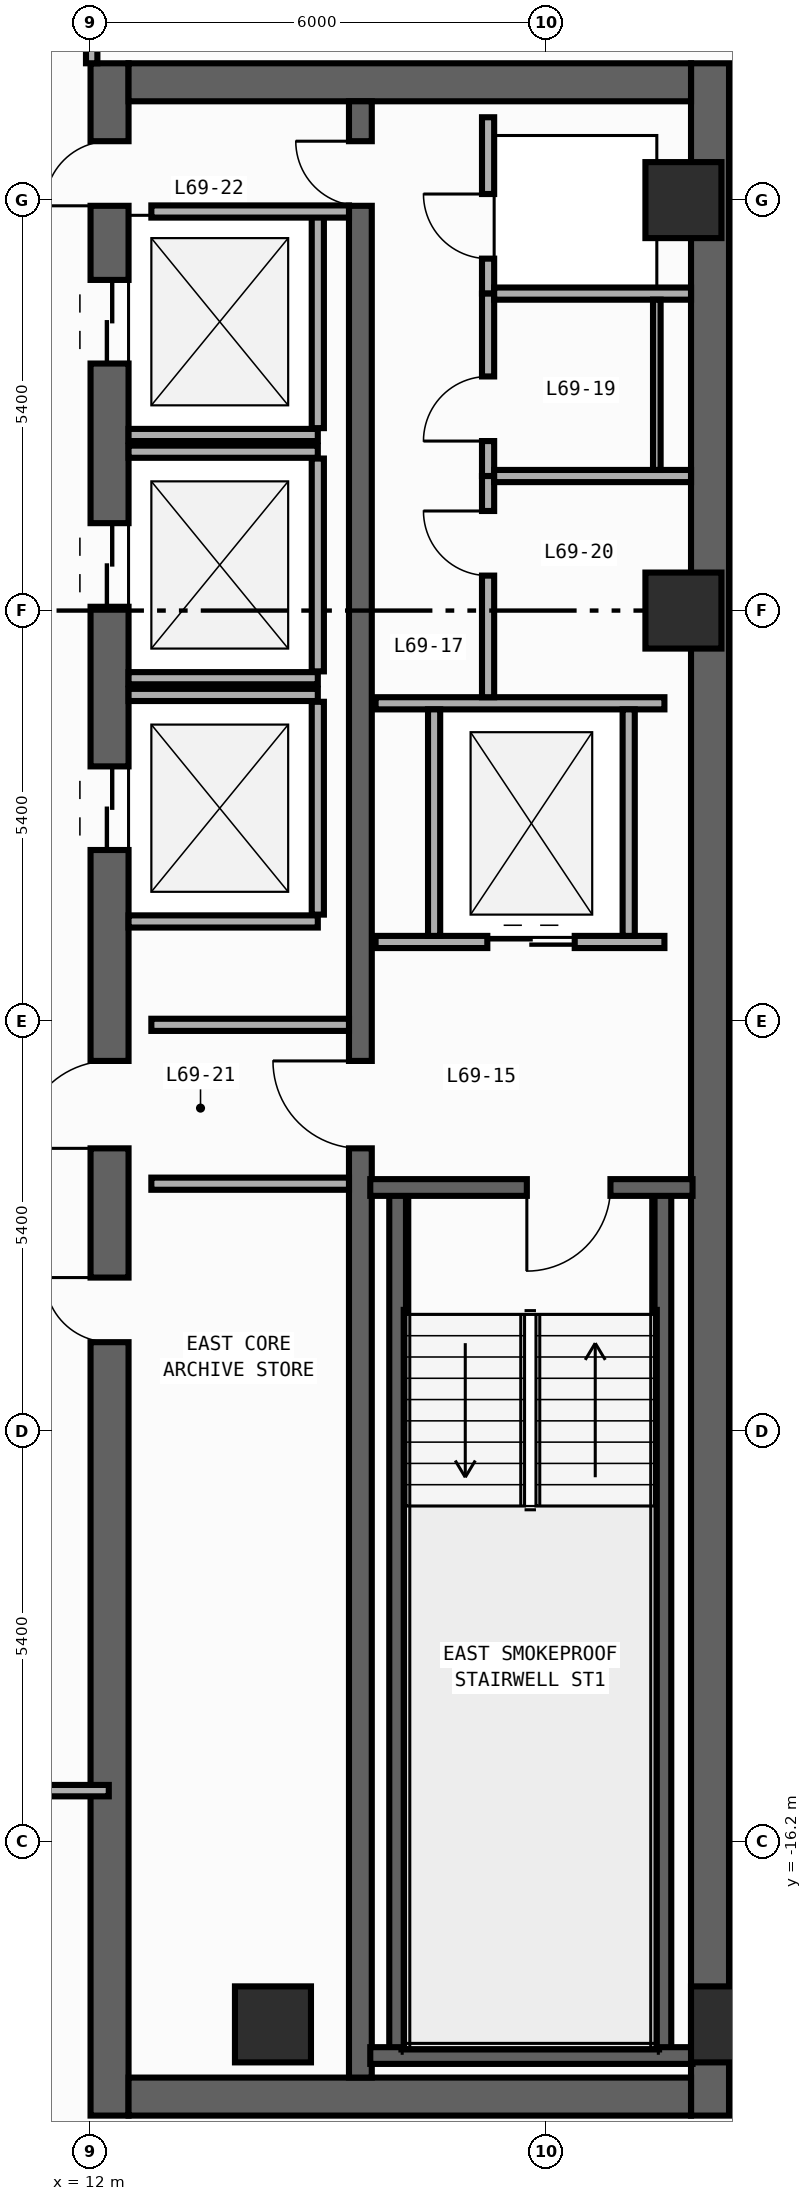
"""IFC4 building model, lengths in metres.
Left out: names, types, materials, properties, quantities, classifications, styles, units other than length and angle.
Written with IfcOpenShell. Run it as: python <this file> out.ifc"""

import sys

from ifc_helpers import new_model, si_unit, direction, frame, frame_2d, origin, origin_2d, place, context, subcontext, project, spatial, rectangle, circle, extrude, element, fill, save


model = new_model("IFC4")
c1 = context("Model", 3, precision=1e-05, world=origin(), true_north=direction((0.0, 1.0)))
c2 = subcontext(c1, "Body", "Model", "MODEL_VIEW")
j1 = project(units=[si_unit("LENGTHUNIT", "METRE"), si_unit("PLANEANGLEUNIT", "RADIAN")], contexts=[c1])
p1 = place(None, origin())
s1 = spatial("IfcSite", under=j1, at=p1, CompositionType="ELEMENT")
p2 = place(p1, origin())
s2 = spatial("IfcBuilding", under=s1, at=p2, CompositionType="ELEMENT")
p3 = place(p2, frame((0.0, 0.0, 289.0)))
s3 = spatial("IfcBuildingStorey", under=s2, at=p3, CompositionType="ELEMENT", Elevation=289.0)
p4 = place(p3, frame((12.25, -19.8, 0.0), z_axis=(0.0, 0.0, 1.0), x_axis=(0.0, 1.0, 0.0)))
e1 = element("IfcWall", 1, at=p4, inside=s3, PredefinedType="SHEAR", context=c2, shape_type="SweptSolid", body=[
    extrude(rectangle(XDim=27.0, YDim=0.5, at=frame_2d((13.5, 0.0))), origin(), (0.0, 0.0, 1.0), 3.54),
])
p5 = place(p4, frame((23.05, 0.0, 0.0)))
e2 = element("IfcOpeningElement", 2, at=p5, cuts=e1, PredefinedType="OPENING", context=c2, shape_type="SweptSolid", body=[
    extrude(rectangle(XDim=1.1, YDim=2.2, at=frame_2d((0.55, 1.1))), frame((0.0, 0.26, 0.0), z_axis=(0.0, -1.0, 0.0), x_axis=(1.0, 0.0, 0.0)), (0.0, 0.0, 1.0), 0.52),
])
p6 = place(p4, frame((19.85, 0.0, 0.0)))
e3 = element("IfcOpeningElement", 3, at=p6, cuts=e1, PredefinedType="OPENING", context=c2, shape_type="SweptSolid", body=[
    extrude(rectangle(XDim=1.1, YDim=2.2, at=frame_2d((0.55, 1.1))), frame((0.0, 0.26, 0.0), z_axis=(0.0, -1.0, 0.0), x_axis=(1.0, 0.0, 0.0)), (0.0, 0.0, 1.0), 0.52),
])
p7 = place(p4, frame((16.65, 0.0, 0.0)))
e4 = element("IfcOpeningElement", 4, at=p7, cuts=e1, PredefinedType="OPENING", context=c2, shape_type="SweptSolid", body=[
    extrude(rectangle(XDim=1.1, YDim=2.2, at=frame_2d((0.55, 1.1))), frame((0.0, 0.26, 0.0), z_axis=(0.0, -1.0, 0.0), x_axis=(1.0, 0.0, 0.0)), (0.0, 0.0, 1.0), 0.52),
])
p8 = place(p4, frame((10.175, 0.0, 0.0)))
e5 = element("IfcOpeningElement", 5, at=p8, cuts=e1, PredefinedType="OPENING", context=c2, shape_type="SweptSolid", body=[
    extrude(rectangle(XDim=0.85, YDim=2.1, at=frame_2d((0.425, 1.05))), frame((0.0, 0.26, 0.0), z_axis=(0.0, -1.0, 0.0), x_axis=(1.0, 0.0, 0.0)), (0.0, 0.0, 1.0), 0.52),
])
p9 = place(p4, frame((12.725, 0.0, 0.0)))
e6 = element("IfcOpeningElement", 6, at=p9, cuts=e1, PredefinedType="OPENING", context=c2, shape_type="SweptSolid", body=[
    extrude(rectangle(XDim=1.15, YDim=2.2, at=frame_2d((0.575, 1.1))), frame((0.0, 0.26, 0.0), z_axis=(0.0, -1.0, 0.0), x_axis=(1.0, 0.0, 0.0)), (0.0, 0.0, 1.0), 0.52),
])
p10 = place(p4, frame((25.125, 0.0, 0.0)))
e7 = element("IfcOpeningElement", 7, at=p10, cuts=e1, PredefinedType="OPENING", context=c2, shape_type="SweptSolid", body=[
    extrude(rectangle(XDim=0.85, YDim=2.1, at=frame_2d((0.425, 1.05))), frame((0.0, 0.26, 0.0), z_axis=(0.0, -1.0, 0.0), x_axis=(1.0, 0.0, 0.0)), (0.0, 0.0, 1.0), 0.52),
])
p11 = place(p3, frame((20.15, -19.8, 0.0), z_axis=(0.0, 0.0, 1.0), x_axis=(0.0, 1.0, 0.0)))
e8 = element("IfcWall", 8, at=p11, inside=s3, PredefinedType="SHEAR", context=c2, shape_type="SweptSolid", body=[
    extrude(rectangle(XDim=27.0, YDim=0.5, at=frame_2d((13.5, 0.0))), origin(), (0.0, 0.0, 1.0), 3.54),
])
for number, where, z_axis, x_axis in (
    (9, (12.5, -19.55, 0.0), (0.0, 0.0, 1.0), (1.0, 0.0, 0.0)),
    (10, (12.5, 6.95, 0.0), (0.0, 0.0, 1.0), (1.0, 0.0, 0.0)),
):
    element("IfcWall", number, at=place(p3, frame(where, z_axis=z_axis, x_axis=x_axis)), inside=s3, PredefinedType="SHEAR", context=c2, shape_type="SweptSolid", body=[
        extrude(rectangle(XDim=7.4, YDim=0.5, at=frame_2d((3.7, 0.0))), origin(), (0.0, 0.0, 1.0), 3.54),
    ])
p12 = place(p3, frame((15.55, -19.3, 0.0), z_axis=(0.0, 0.0, 1.0), x_axis=(0.0, 1.0, 0.0)))
e11 = element("IfcWall", 11, at=p12, inside=s3, PredefinedType="SHEAR", context=c2, shape_type="SweptSolid", body=[
    extrude(rectangle(XDim=26.0, YDim=0.3, at=frame_2d((13.0, 0.0))), origin(), (0.0, 0.0, 1.0), 3.54),
])
p13 = place(p12, frame((12.225, 0.0, 0.0)))
e12 = element("IfcOpeningElement", 12, at=p13, cuts=e11, PredefinedType="OPENING", context=c2, shape_type="SweptSolid", body=[
    extrude(rectangle(XDim=1.15, YDim=2.2, at=frame_2d((0.575, 1.1))), frame((0.0, 0.16, 0.0), z_axis=(0.0, -1.0, 0.0), x_axis=(1.0, 0.0, 0.0)), (0.0, 0.0, 1.0), 0.32),
])
p14 = place(p12, frame((24.625, 0.0, 0.0)))
e13 = element("IfcOpeningElement", 13, at=p14, cuts=e11, PredefinedType="OPENING", context=c2, shape_type="SweptSolid", body=[
    extrude(rectangle(XDim=0.85, YDim=2.1, at=frame_2d((0.425, 1.05))), frame((0.0, 0.16, 0.0), z_axis=(0.0, -1.0, 0.0), x_axis=(1.0, 0.0, 0.0)), (0.0, 0.0, 1.0), 0.32),
])
for number, where, z_axis, x_axis in (
    (14, (16.04, -19.01, 0.0), (0.0, 0.0, 1.0), (0.0, 1.0, 0.0)),
    (15, (19.53, -19.01, 0.0), (0.0, 0.0, 1.0), (0.0, 1.0, 0.0)),
):
    element("IfcWall", number, at=place(p3, frame(where, z_axis=z_axis, x_axis=x_axis)), inside=s3, PredefinedType="SHEAR", context=c2, shape_type="SweptSolid", body=[
        extrude(rectangle(XDim=11.42, YDim=0.22, at=frame_2d((5.71, 0.0))), origin(), (0.0, 0.0, 1.0), 3.54),
    ])
p15 = place(p3, frame((15.68, -19.01, 0.0), z_axis=(0.0, 0.0, 1.0), x_axis=(1.0, 0.0, 0.0)))
e16 = element("IfcWall", 16, at=p15, inside=s3, PredefinedType="SHEAR", context=c2, shape_type="SweptSolid", body=[
    extrude(rectangle(XDim=4.24, YDim=0.22, at=frame_2d((2.12, 0.0))), origin(), (0.0, 0.0, 1.0), 3.54),
])
p16 = place(p3, frame((19.92, -7.59, 0.0), z_axis=(0.0, 0.0, 1.0), x_axis=(-1.0, 0.0, 0.0)))
e17 = element("IfcWall", 17, at=p16, inside=s3, PredefinedType="SHEAR", context=c2, shape_type="SweptSolid", body=[
    extrude(rectangle(XDim=4.24, YDim=0.22, at=frame_2d((2.12, 0.0))), origin(), (0.0, 0.0, 1.0), 3.54),
])
p17 = place(p16, frame((1.08, 0.0, 0.0)))
e18 = element("IfcOpeningElement", 18, at=p17, cuts=e17, PredefinedType="OPENING", context=c2, shape_type="SweptSolid", body=[
    extrude(rectangle(XDim=1.1, YDim=2.2, at=frame_2d((0.55, 1.1))), frame((0.0, 0.12, 0.0), z_axis=(0.0, -1.0, 0.0), x_axis=(1.0, 0.0, 0.0)), (0.0, 0.0, 1.0), 0.24),
])
for number, where, z_axis, x_axis in (
    (19, (20.4, -18.6, 0.0), (0.0, 0.0, 1.0), (1.0, 0.0, 0.0)),
    (20, (14.4, -18.6, 0.0), (0.0, 0.0, 1.0), (1.0, 0.0, 0.0)),
    (21, (19.8, 0.0, 0.0), (0.0, 0.0, 1.0), (1.0, 0.0, 0.0)),
    (22, (19.8, 5.4, 0.0), (0.0, 0.0, 1.0), (1.0, 0.0, 0.0)),
):
    element("IfcColumn", number, at=place(p3, frame(where, z_axis=z_axis, x_axis=x_axis)), inside=s3, PredefinedType="COLUMN", context=c2, shape_type="SweptSolid", body=[
        extrude(circle(Radius=0.5, at=origin_2d()), origin(), (0.0, 0.0, 1.0), 3.8),
    ])
p18 = place(p3, frame((12.5, 2.31, 0.0), z_axis=(0.0, 0.0, 1.0), x_axis=(1.0, 0.0, 0.0)))
e23 = element("IfcWall", 23, at=p18, inside=s3, PredefinedType="STANDARD", context=c2, shape_type="SweptSolid", body=[
    extrude(rectangle(XDim=2.49, YDim=0.16, at=frame_2d((1.245, 0.0))), origin(), (0.0, 0.0, 1.0), 3.54),
])
p19 = place(p3, frame((14.99, 2.4, 0.0), z_axis=(0.0, 0.0, 1.0), x_axis=(0.0, 1.0, 0.0)))
e24 = element("IfcWall", 24, at=p19, inside=s3, PredefinedType="STANDARD", context=c2, shape_type="SweptSolid", body=[
    extrude(rectangle(XDim=2.8, YDim=0.16, at=frame_2d((1.4, 0.0))), origin(), (0.0, 0.0, 1.0), 3.54),
])
for number, where, z_axis, x_axis in (
    (25, (12.5, -0.89, 0.0), (0.0, 0.0, 1.0), (1.0, 0.0, 0.0)),
    (26, (12.5, 2.09, 0.0), (0.0, 0.0, 1.0), (1.0, 0.0, 0.0)),
):
    element("IfcWall", number, at=place(p3, frame(where, z_axis=z_axis, x_axis=x_axis)), inside=s3, PredefinedType="STANDARD", context=c2, shape_type="SweptSolid", body=[
        extrude(rectangle(XDim=2.49, YDim=0.16, at=frame_2d((1.245, 0.0))), origin(), (0.0, 0.0, 1.0), 3.54),
    ])
p20 = place(p3, frame((14.99, -0.8, 0.0), z_axis=(0.0, 0.0, 1.0), x_axis=(0.0, 1.0, 0.0)))
e27 = element("IfcWall", 27, at=p20, inside=s3, PredefinedType="STANDARD", context=c2, shape_type="SweptSolid", body=[
    extrude(rectangle(XDim=2.8, YDim=0.16, at=frame_2d((1.4, 0.0))), origin(), (0.0, 0.0, 1.0), 3.54),
])
for number, where, z_axis, x_axis in (
    (28, (12.5, -4.09, 0.0), (0.0, 0.0, 1.0), (1.0, 0.0, 0.0)),
    (29, (12.5, -1.11, 0.0), (0.0, 0.0, 1.0), (1.0, 0.0, 0.0)),
):
    element("IfcWall", number, at=place(p3, frame(where, z_axis=z_axis, x_axis=x_axis)), inside=s3, PredefinedType="STANDARD", context=c2, shape_type="SweptSolid", body=[
        extrude(rectangle(XDim=2.49, YDim=0.16, at=frame_2d((1.245, 0.0))), origin(), (0.0, 0.0, 1.0), 3.54),
    ])
p21 = place(p3, frame((14.99, -4.0, 0.0), z_axis=(0.0, 0.0, 1.0), x_axis=(0.0, 1.0, 0.0)))
e30 = element("IfcWall", 30, at=p21, inside=s3, PredefinedType="STANDARD", context=c2, shape_type="SweptSolid", body=[
    extrude(rectangle(XDim=2.8, YDim=0.16, at=frame_2d((1.4, 0.0))), origin(), (0.0, 0.0, 1.0), 3.54),
])
p22 = place(p3, frame((15.75, -4.36, 0.0), z_axis=(0.0, 0.0, 1.0), x_axis=(1.0, 0.0, 0.0)))
e31 = element("IfcWall", 31, at=p22, inside=s3, PredefinedType="STANDARD", context=c2, shape_type="SweptSolid", body=[
    extrude(rectangle(XDim=3.8, YDim=0.16, at=frame_2d((1.9, 0.0))), origin(), (0.0, 0.0, 1.0), 3.54),
])
p23 = place(p22, frame((1.47, 0.0, 0.0)))
e32 = element("IfcOpeningElement", 32, at=p23, cuts=e31, PredefinedType="OPENING", context=c2, shape_type="SweptSolid", body=[
    extrude(rectangle(XDim=1.15, YDim=2.2, at=frame_2d((0.575, 1.1))), frame((0.0, 0.09, 0.0), z_axis=(0.0, -1.0, 0.0), x_axis=(1.0, 0.0, 0.0)), (0.0, 0.0, 1.0), 0.18),
])
p24 = place(p3, frame((15.75, -1.22, 0.0), z_axis=(0.0, 0.0, 1.0), x_axis=(1.0, 0.0, 0.0)))
e33 = element("IfcWall", 33, at=p24, inside=s3, PredefinedType="STANDARD", context=c2, shape_type="SweptSolid", body=[
    extrude(rectangle(XDim=3.8, YDim=0.16, at=frame_2d((1.9, 0.0))), origin(), (0.0, 0.0, 1.0), 3.54),
])
for number, where, z_axis, x_axis in (
    (34, (16.52, -4.28, 0.0), (0.0, 0.0, 1.0), (0.0, 1.0, 0.0)),
    (35, (19.08, -4.28, 0.0), (0.0, 0.0, 1.0), (0.0, 1.0, 0.0)),
):
    element("IfcWall", number, at=place(p3, frame(where, z_axis=z_axis, x_axis=x_axis)), inside=s3, PredefinedType="STANDARD", context=c2, shape_type="SweptSolid", body=[
        extrude(rectangle(XDim=2.98, YDim=0.16, at=frame_2d((1.49, 0.0))), origin(), (0.0, 0.0, 1.0), 3.54),
    ])
for number, where, z_axis, x_axis in (
    (36, (12.8, -5.45, 0.0), (0.0, 0.0, 1.0), (1.0, 0.0, 0.0)),
    (37, (12.8, -7.54, 0.0), (0.0, 0.0, 1.0), (1.0, 0.0, 0.0)),
    (38, (12.8, 5.25, 0.0), (0.0, 0.0, 1.0), (1.0, 0.0, 0.0)),
):
    element("IfcWall", number, at=place(p3, frame(where, z_axis=z_axis, x_axis=x_axis)), inside=s3, PredefinedType="STANDARD", context=c2, shape_type="SweptSolid", body=[
        extrude(rectangle(XDim=2.6, YDim=0.16, at=frame_2d((1.3, 0.0))), origin(), (0.0, 0.0, 1.0), 3.54),
    ])
p25 = place(p3, frame((17.23, 4.17, 0.0), z_axis=(0.0, 0.0, 1.0), x_axis=(0.0, 1.0, 0.0)))
e39 = element("IfcWall", 39, at=p25, inside=s3, PredefinedType="PARTITIONING", context=c2, shape_type="SweptSolid", body=[
    extrude(rectangle(XDim=2.32, YDim=0.16, at=frame_2d((1.16, 0.0))), origin(), (0.0, 0.0, 1.0), 3.54),
])
p26 = place(p25, frame((0.46, 0.0, 0.0)))
e40 = element("IfcOpeningElement", 40, at=p26, cuts=e39, PredefinedType="OPENING", context=c2, shape_type="SweptSolid", body=[
    extrude(rectangle(XDim=0.85, YDim=2.1, at=frame_2d((0.425, 1.05))), frame((0.0, 0.09, 0.0), z_axis=(0.0, -1.0, 0.0), x_axis=(1.0, 0.0, 0.0)), (0.0, 0.0, 1.0), 0.18),
])
p27 = place(p3, frame((17.23, 1.77, 0.0), z_axis=(0.0, 0.0, 1.0), x_axis=(0.0, 1.0, 0.0)))
e41 = element("IfcWall", 41, at=p27, inside=s3, PredefinedType="PARTITIONING", context=c2, shape_type="SweptSolid", body=[
    extrude(rectangle(XDim=2.4, YDim=0.16, at=frame_2d((1.2, 0.0))), origin(), (0.0, 0.0, 1.0), 3.54),
])
p28 = place(p27, frame((0.46, 0.0, 0.0)))
e42 = element("IfcOpeningElement", 42, at=p28, cuts=e41, PredefinedType="OPENING", context=c2, shape_type="SweptSolid", body=[
    extrude(rectangle(XDim=0.85, YDim=2.1, at=frame_2d((0.425, 1.05))), frame((0.0, 0.09, 0.0), z_axis=(0.0, -1.0, 0.0), x_axis=(1.0, 0.0, 0.0)), (0.0, 0.0, 1.0), 0.18),
])
p29 = place(p3, frame((17.23, -1.14, 0.0), z_axis=(0.0, 0.0, 1.0), x_axis=(0.0, 1.0, 0.0)))
e43 = element("IfcWall", 43, at=p29, inside=s3, PredefinedType="PARTITIONING", context=c2, shape_type="SweptSolid", body=[
    extrude(rectangle(XDim=2.91, YDim=0.16, at=frame_2d((1.455, 0.0))), origin(), (0.0, 0.0, 1.0), 3.54),
])
p30 = place(p29, frame((1.6, 0.0, 0.0)))
e44 = element("IfcOpeningElement", 44, at=p30, cuts=e43, PredefinedType="OPENING", context=c2, shape_type="SweptSolid", body=[
    extrude(rectangle(XDim=0.85, YDim=2.1, at=frame_2d((0.425, 1.05))), frame((0.0, 0.09, 0.0), z_axis=(0.0, -1.0, 0.0), x_axis=(1.0, 0.0, 0.0)), (0.0, 0.0, 1.0), 0.18),
])
for number, where, z_axis, x_axis in (
    (45, (17.31, 4.17, 0.0), (0.0, 0.0, 1.0), (1.0, 0.0, 0.0)),
    (46, (17.31, 1.77, 0.0), (0.0, 0.0, 1.0), (1.0, 0.0, 0.0)),
):
    element("IfcWall", number, at=place(p3, frame(where, z_axis=z_axis, x_axis=x_axis)), inside=s3, PredefinedType="PARTITIONING", context=c2, shape_type="SweptSolid", body=[
        extrude(rectangle(XDim=2.59, YDim=0.16, at=frame_2d((1.295, 0.0))), origin(), (0.0, 0.0, 1.0), 3.54),
    ])
p31 = place(p3, frame((12.015, 7.2, 0.0), z_axis=(0.0, 0.0, 1.0), x_axis=(0.0, 1.0, 0.0)))
e47 = element("IfcWall", 47, at=p31, inside=s3, PredefinedType="PARTITIONING", context=c2, shape_type="SweptSolid", body=[
    extrude(rectangle(XDim=6.68, YDim=0.15, at=frame_2d((3.34, 0.0))), origin(), (0.0, 0.0, 1.0), 3.54),
])
p32 = place(p31, frame((0.67, 0.0, 0.0)))
e48 = element("IfcOpeningElement", 48, at=p32, cuts=e47, PredefinedType="OPENING", context=c2, shape_type="SweptSolid", body=[
    extrude(rectangle(XDim=0.9, YDim=2.15, at=frame_2d((0.45, 1.075))), frame((0.0, 0.085, 0.0), z_axis=(0.0, -1.0, 0.0), x_axis=(1.0, 0.0, 0.0)), (0.0, 0.0, 1.0), 0.17),
])
p33 = place(p3, frame((9.705, -15.525, 0.0), z_axis=(0.0, 0.0, 1.0), x_axis=(1.0, 0.0, 0.0)))
e49 = element("IfcWall", 49, at=p33, inside=s3, PredefinedType="PARTITIONING", context=c2, shape_type="SweptSolid", body=[
    extrude(rectangle(XDim=2.535, YDim=0.15, at=frame_2d((1.268, 0.0))), origin(), (0.0, 0.0, 1.0), 3.54),
])
p34 = place(p3, frame((19.45, 4.09, 0.0), z_axis=(0.0, 0.0, 1.0), x_axis=(0.0, -1.0, 0.0)))
e50 = element("IfcWall", 50, at=p34, inside=s3, PredefinedType="PARTITIONING", context=c2, shape_type="SweptSolid", body=[
    extrude(rectangle(XDim=2.24, YDim=0.1, at=frame_2d((1.12, 0.0))), origin(), (0.0, 0.0, 1.0), 3.54),
])
p35 = place(p17, origin())
e51 = element("IfcDoor", 51, at=p35, inside=s3, OperationType="SINGLE_SWING_RIGHT", PredefinedType="DOOR", context=c2, shape_type="SweptSolid", body=[
    extrude(rectangle(XDim=1.1, YDim=2.2, at=frame_2d((0.55, 1.1))), frame((0.0, 0.025, 0.0), z_axis=(0.0, -1.0, 0.0), x_axis=(1.0, 0.0, 0.0)), (0.0, 0.0, 1.0), 0.05),
])
fill(e18, e51)
p36 = place(p5, origin())
e52 = element("IfcDoor", 52, at=p36, inside=s3, OperationType="DOUBLE_DOOR_SLIDING", PredefinedType="DOOR", context=c2, shape_type="SweptSolid", body=[
    extrude(rectangle(XDim=1.1, YDim=2.2, at=frame_2d((0.55, 1.1))), frame((0.0, 0.025, 0.0), z_axis=(0.0, -1.0, 0.0), x_axis=(1.0, 0.0, 0.0)), (0.0, 0.0, 1.0), 0.05),
])
fill(e2, e52)
p37 = place(p6, origin())
e53 = element("IfcDoor", 53, at=p37, inside=s3, OperationType="DOUBLE_DOOR_SLIDING", PredefinedType="DOOR", context=c2, shape_type="SweptSolid", body=[
    extrude(rectangle(XDim=1.1, YDim=2.2, at=frame_2d((0.55, 1.1))), frame((0.0, 0.025, 0.0), z_axis=(0.0, -1.0, 0.0), x_axis=(1.0, 0.0, 0.0)), (0.0, 0.0, 1.0), 0.05),
])
fill(e3, e53)
p38 = place(p7, origin())
e54 = element("IfcDoor", 54, at=p38, inside=s3, OperationType="DOUBLE_DOOR_SLIDING", PredefinedType="DOOR", context=c2, shape_type="SweptSolid", body=[
    extrude(rectangle(XDim=1.1, YDim=2.2, at=frame_2d((0.55, 1.1))), frame((0.0, 0.025, 0.0), z_axis=(0.0, -1.0, 0.0), x_axis=(1.0, 0.0, 0.0)), (0.0, 0.0, 1.0), 0.05),
])
fill(e4, e54)
p39 = place(p8, origin())
e55 = element("IfcDoor", 55, at=p39, inside=s3, OperationType="SINGLE_SWING_RIGHT", PredefinedType="DOOR", context=c2, shape_type="SweptSolid", body=[
    extrude(rectangle(XDim=0.85, YDim=2.1, at=frame_2d((0.425, 1.05))), frame((0.0, 0.025, 0.0), z_axis=(0.0, -1.0, 0.0), x_axis=(1.0, 0.0, 0.0)), (0.0, 0.0, 1.0), 0.05),
])
fill(e5, e55)
p40 = place(p9, origin())
e56 = element("IfcDoor", 56, at=p40, inside=s3, OperationType="SINGLE_SWING_LEFT", PredefinedType="DOOR", context=c2, shape_type="SweptSolid", body=[
    extrude(rectangle(XDim=1.15, YDim=2.2, at=frame_2d((0.575, 1.1))), frame((0.0, 0.025, 0.0), z_axis=(0.0, -1.0, 0.0), x_axis=(1.0, 0.0, 0.0)), (0.0, 0.0, 1.0), 0.05),
])
fill(e6, e56)
p41 = place(p13, origin())
e57 = element("IfcDoor", 57, at=p41, inside=s3, OperationType="SINGLE_SWING_RIGHT", PredefinedType="DOOR", context=c2, shape_type="SweptSolid", body=[
    extrude(rectangle(XDim=1.15, YDim=2.2, at=frame_2d((0.575, 1.1))), frame((0.0, 0.025, 0.0), z_axis=(0.0, -1.0, 0.0), x_axis=(1.0, 0.0, 0.0)), (0.0, 0.0, 1.0), 0.05),
])
fill(e12, e57)
p42 = place(p10, origin())
e58 = element("IfcDoor", 58, at=p42, inside=s3, OperationType="SINGLE_SWING_LEFT", PredefinedType="DOOR", context=c2, shape_type="SweptSolid", body=[
    extrude(rectangle(XDim=0.85, YDim=2.1, at=frame_2d((0.425, 1.05))), frame((0.0, 0.025, 0.0), z_axis=(0.0, -1.0, 0.0), x_axis=(1.0, 0.0, 0.0)), (0.0, 0.0, 1.0), 0.05),
])
fill(e7, e58)
p43 = place(p14, origin())
e59 = element("IfcDoor", 59, at=p43, inside=s3, OperationType="SINGLE_SWING_RIGHT", PredefinedType="DOOR", context=c2, shape_type="SweptSolid", body=[
    extrude(rectangle(XDim=0.85, YDim=2.1, at=frame_2d((0.425, 1.05))), frame((0.0, 0.025, 0.0), z_axis=(0.0, -1.0, 0.0), x_axis=(1.0, 0.0, 0.0)), (0.0, 0.0, 1.0), 0.05),
])
fill(e13, e59)
p44 = place(p23, origin())
e60 = element("IfcDoor", 60, at=p44, inside=s3, OperationType="DOUBLE_DOOR_SLIDING", PredefinedType="DOOR", context=c2, shape_type="SweptSolid", body=[
    extrude(rectangle(XDim=1.15, YDim=2.2, at=frame_2d((0.575, 1.1))), frame((0.0, 0.025, 0.0), z_axis=(0.0, -1.0, 0.0), x_axis=(1.0, 0.0, 0.0)), (0.0, 0.0, 1.0), 0.05),
])
fill(e32, e60)
p45 = place(p26, origin())
e61 = element("IfcDoor", 61, at=p45, inside=s3, OperationType="SINGLE_SWING_RIGHT", PredefinedType="DOOR", context=c2, shape_type="SweptSolid", body=[
    extrude(rectangle(XDim=0.85, YDim=2.1, at=frame_2d((0.425, 1.05))), frame((0.0, 0.025, 0.0), z_axis=(0.0, -1.0, 0.0), x_axis=(1.0, 0.0, 0.0)), (0.0, 0.0, 1.0), 0.05),
])
fill(e40, e61)
p46 = place(p28, origin())
e62 = element("IfcDoor", 62, at=p46, inside=s3, OperationType="SINGLE_SWING_LEFT", PredefinedType="DOOR", context=c2, shape_type="SweptSolid", body=[
    extrude(rectangle(XDim=0.85, YDim=2.1, at=frame_2d((0.425, 1.05))), frame((0.0, 0.025, 0.0), z_axis=(0.0, -1.0, 0.0), x_axis=(1.0, 0.0, 0.0)), (0.0, 0.0, 1.0), 0.05),
])
fill(e42, e62)
p47 = place(p30, origin())
e63 = element("IfcDoor", 63, at=p47, inside=s3, OperationType="SINGLE_SWING_RIGHT", PredefinedType="DOOR", context=c2, shape_type="SweptSolid", body=[
    extrude(rectangle(XDim=0.85, YDim=2.1, at=frame_2d((0.425, 1.05))), frame((0.0, 0.025, 0.0), z_axis=(0.0, -1.0, 0.0), x_axis=(1.0, 0.0, 0.0)), (0.0, 0.0, 1.0), 0.05),
])
fill(e44, e63)
save(model, sys.argv[1])
